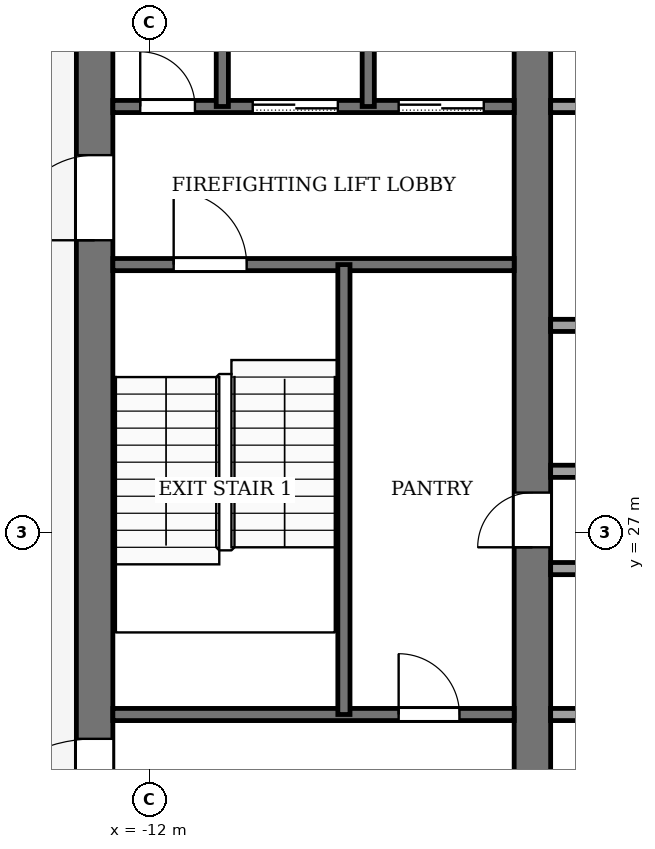
"""IFC4 building model, lengths in metres.
Left out: names, types, materials, properties, quantities, classifications, styles, units other than length and angle.
Written with IfcOpenShell. Run it as: python <this file> out.ifc"""

import sys

from ifc_helpers import new_model, si_unit, direction, frame, frame_2d, origin, place, context, subcontext, project, spatial, rectangle, extrude, element, fill, save


model = new_model("IFC4")
c1 = context("Model", 3, precision=1e-05, world=origin(), true_north=direction((0.0, 1.0)))
c2 = subcontext(c1, "Body", "Model", "MODEL_VIEW")
j1 = project(units=[si_unit("LENGTHUNIT", "METRE"), si_unit("PLANEANGLEUNIT", "RADIAN")], contexts=[c1])
p1 = place(None, origin())
s1 = spatial("IfcSite", under=j1, at=p1, CompositionType="ELEMENT")
p2 = place(p1, origin())
s2 = spatial("IfcBuilding", under=s1, at=p2, CompositionType="ELEMENT")
p3 = place(p2, frame((0.0, 0.0, 294.0)))
s3 = spatial("IfcBuildingStorey", under=s2, at=p3, CompositionType="ELEMENT", Elevation=294.0)
p4 = place(p3, frame((-12.9, 18.4, -0.13), z_axis=(0.0, 0.0, 1.0), x_axis=(0.0, 1.0, 0.0)))
e1 = element("IfcWall", 1, at=p4, inside=s3, PredefinedType="SHEAR", context=c2, shape_type="SweptSolid", body=[
    extrude(rectangle(XDim=19.2, YDim=0.6, at=frame_2d((9.6, 0.0))), origin(), (0.0, 0.0, 1.0), 4.0),
])
p5 = place(p4, frame((2.8, 0.0, 0.13)))
e2 = element("IfcOpeningElement", 2, at=p5, cuts=e1, PredefinedType="OPENING", context=c2, shape_type="SweptSolid", body=[
    extrude(rectangle(XDim=2.4, YDim=2.4, at=frame_2d((1.2, 1.2))), frame((0.0, 0.31, 0.0), z_axis=(0.0, -1.0, 0.0), x_axis=(1.0, 0.0, 0.0)), (0.0, 0.0, 1.0), 0.62),
])
p6 = place(p4, frame((13.4, 0.0, 0.13)))
e3 = element("IfcOpeningElement", 3, at=p6, cuts=e1, PredefinedType="OPENING", context=c2, shape_type="SweptSolid", body=[
    extrude(rectangle(XDim=1.4, YDim=2.2, at=frame_2d((0.7, 1.1))), frame((0.0, 0.31, 0.0), z_axis=(0.0, -1.0, 0.0), x_axis=(1.0, 0.0, 0.0)), (0.0, 0.0, 1.0), 0.62),
])
p7 = place(p3, frame((-5.7, 18.4, -0.13), z_axis=(0.0, 0.0, 1.0), x_axis=(0.0, 1.0, 0.0)))
e4 = element("IfcWall", 4, at=p7, inside=s3, PredefinedType="SHEAR", context=c2, shape_type="SweptSolid", body=[
    extrude(rectangle(XDim=19.2, YDim=0.6, at=frame_2d((9.6, 0.0))), origin(), (0.0, 0.0, 1.0), 4.0),
])
p8 = place(p7, frame((8.35, 0.0, 0.13)))
e5 = element("IfcOpeningElement", 5, at=p8, cuts=e4, PredefinedType="OPENING", context=c2, shape_type="SweptSolid", body=[
    extrude(rectangle(XDim=0.9, YDim=2.1, at=frame_2d((0.45, 1.05))), frame((0.0, 0.31, 0.0), z_axis=(0.0, -1.0, 0.0), x_axis=(1.0, 0.0, 0.0)), (0.0, 0.0, 1.0), 0.62),
])
p9 = place(p3, frame((-12.6, 24.0, 0.0), z_axis=(0.0, 0.0, 1.0), x_axis=(1.0, 0.0, 0.0)))
e6 = element("IfcWall", 6, at=p9, inside=s3, PredefinedType="PARTITIONING", context=c2, shape_type="SweptSolid", body=[
    extrude(rectangle(XDim=6.6, YDim=0.2, at=frame_2d((3.3, 0.0))), origin(), (0.0, 0.0, 1.0), 3.87),
])
p10 = place(p9, frame((4.7, 0.0, 0.0)))
e7 = element("IfcOpeningElement", 7, at=p10, cuts=e6, PredefinedType="OPENING", context=c2, shape_type="SweptSolid", body=[
    extrude(rectangle(XDim=1.0, YDim=2.1, at=frame_2d((0.5, 1.05))), frame((0.0, 0.11, 0.0), z_axis=(0.0, -1.0, 0.0), x_axis=(1.0, 0.0, 0.0)), (0.0, 0.0, 1.0), 0.22),
])
p11 = place(p3, frame((-5.4, 24.0, 0.0), z_axis=(0.0, 0.0, 1.0), x_axis=(1.0, 0.0, 0.0)))
e8 = element("IfcWall", 8, at=p11, inside=s3, PredefinedType="PARTITIONING", context=c2, shape_type="SweptSolid", body=[
    extrude(rectangle(XDim=10.8, YDim=0.2, at=frame_2d((5.4, 0.0))), origin(), (0.0, 0.0, 1.0), 3.87),
])
p12 = place(p11, frame((2.632, 0.0, 0.0)))
e9 = element("IfcOpeningElement", 9, at=p12, cuts=e8, PredefinedType="OPENING", context=c2, shape_type="SweptSolid", body=[
    extrude(rectangle(XDim=1.0, YDim=2.1, at=frame_2d((0.5, 1.05))), frame((0.0, 0.11, 0.0), z_axis=(0.0, -1.0, 0.0), x_axis=(1.0, 0.0, 0.0)), (0.0, 0.0, 1.0), 0.22),
])
p13 = place(p11, frame((8.032, 0.0, 0.0)))
e10 = element("IfcOpeningElement", 10, at=p13, cuts=e8, PredefinedType="OPENING", context=c2, shape_type="SweptSolid", body=[
    extrude(rectangle(XDim=1.0, YDim=2.1, at=frame_2d((0.5, 1.05))), frame((0.0, 0.11, 0.0), z_axis=(0.0, -1.0, 0.0), x_axis=(1.0, 0.0, 0.0)), (0.0, 0.0, 1.0), 0.22),
])
for number, where, z_axis, x_axis in (
    (11, (-5.4, 26.4, 0.0), (0.0, 0.0, 1.0), (1.0, 0.0, 0.0)),
    (12, (-5.4, 28.0, 0.0), (0.0, 0.0, 1.0), (1.0, 0.0, 0.0)),
):
    element("IfcWall", number, at=place(p3, frame(where, z_axis=z_axis, x_axis=x_axis)), inside=s3, PredefinedType="PARTITIONING", context=c2, shape_type="SweptSolid", body=[
        extrude(rectangle(XDim=10.8, YDim=0.2, at=frame_2d((5.4, 0.0))), origin(), (0.0, 0.0, 1.0), 3.87),
    ])
p14 = place(p3, frame((-5.4, 30.4, 0.0), z_axis=(0.0, 0.0, 1.0), x_axis=(1.0, 0.0, 0.0)))
e13 = element("IfcWall", 13, at=p14, inside=s3, PredefinedType="PARTITIONING", context=c2, shape_type="SweptSolid", body=[
    extrude(rectangle(XDim=10.8, YDim=0.2, at=frame_2d((5.4, 0.0))), origin(), (0.0, 0.0, 1.0), 3.87),
])
p15 = place(p14, frame((2.848, 0.0, 0.0)))
e14 = element("IfcOpeningElement", 14, at=p15, cuts=e13, PredefinedType="OPENING", context=c2, shape_type="SweptSolid", body=[
    extrude(rectangle(XDim=1.0, YDim=2.1, at=frame_2d((0.5, 1.05))), frame((0.0, 0.11, 0.0), z_axis=(0.0, -1.0, 0.0), x_axis=(1.0, 0.0, 0.0)), (0.0, 0.0, 1.0), 0.22),
])
p16 = place(p14, frame((8.248, 0.0, 0.0)))
e15 = element("IfcOpeningElement", 15, at=p16, cuts=e13, PredefinedType="OPENING", context=c2, shape_type="SweptSolid", body=[
    extrude(rectangle(XDim=1.0, YDim=2.1, at=frame_2d((0.5, 1.05))), frame((0.0, 0.11, 0.0), z_axis=(0.0, -1.0, 0.0), x_axis=(1.0, 0.0, 0.0)), (0.0, 0.0, 1.0), 0.22),
])
p17 = place(p3, frame((-12.6, 31.4, 0.0), z_axis=(0.0, 0.0, 1.0), x_axis=(1.0, 0.0, 0.0)))
e16 = element("IfcWall", 16, at=p17, inside=s3, PredefinedType="PARTITIONING", context=c2, shape_type="SweptSolid", body=[
    extrude(rectangle(XDim=6.6, YDim=0.2, at=frame_2d((3.3, 0.0))), origin(), (0.0, 0.0, 1.0), 3.87),
])
p18 = place(p17, frame((1.0, 0.0, 0.0)))
e17 = element("IfcOpeningElement", 17, at=p18, cuts=e16, PredefinedType="OPENING", context=c2, shape_type="SweptSolid", body=[
    extrude(rectangle(XDim=1.2, YDim=2.2, at=frame_2d((0.6, 1.1))), frame((0.0, 0.11, 0.0), z_axis=(0.0, -1.0, 0.0), x_axis=(1.0, 0.0, 0.0)), (0.0, 0.0, 1.0), 0.22),
])
p19 = place(p3, frame((-12.6, 34.0, 0.0), z_axis=(0.0, 0.0, 1.0), x_axis=(1.0, 0.0, 0.0)))
e18 = element("IfcWall", 18, at=p19, inside=s3, PredefinedType="PARTITIONING", context=c2, shape_type="SweptSolid", body=[
    extrude(rectangle(XDim=6.6, YDim=0.2, at=frame_2d((3.3, 0.0))), origin(), (0.0, 0.0, 1.0), 3.87),
])
p20 = place(p19, frame((4.7, 0.0, 0.0)))
e19 = element("IfcOpeningElement", 19, at=p20, cuts=e18, PredefinedType="OPENING", context=c2, shape_type="SweptSolid", body=[
    extrude(rectangle(XDim=1.4, YDim=2.2, at=frame_2d((0.7, 1.1))), frame((0.0, 0.11, 0.0), z_axis=(0.0, -1.0, 0.0), x_axis=(1.0, 0.0, 0.0)), (0.0, 0.0, 1.0), 0.22),
])
p21 = place(p19, frame((2.3, 0.0, 0.0)))
e20 = element("IfcOpeningElement", 20, at=p21, cuts=e18, PredefinedType="OPENING", context=c2, shape_type="SweptSolid", body=[
    extrude(rectangle(XDim=1.4, YDim=2.2, at=frame_2d((0.7, 1.1))), frame((0.0, 0.11, 0.0), z_axis=(0.0, -1.0, 0.0), x_axis=(1.0, 0.0, 0.0)), (0.0, 0.0, 1.0), 0.22),
])
p22 = place(p19, frame((0.45, 0.0, 0.0)))
e21 = element("IfcOpeningElement", 21, at=p22, cuts=e18, PredefinedType="OPENING", context=c2, shape_type="SweptSolid", body=[
    extrude(rectangle(XDim=0.9, YDim=2.1, at=frame_2d((0.45, 1.05))), frame((0.0, 0.11, 0.0), z_axis=(0.0, -1.0, 0.0), x_axis=(1.0, 0.0, 0.0)), (0.0, 0.0, 1.0), 0.22),
])
p23 = place(p3, frame((-5.4, 34.0, 0.0), z_axis=(0.0, 0.0, 1.0), x_axis=(1.0, 0.0, 0.0)))
e22 = element("IfcWall", 22, at=p23, inside=s3, PredefinedType="PARTITIONING", context=c2, shape_type="SweptSolid", body=[
    extrude(rectangle(XDim=10.8, YDim=0.2, at=frame_2d((5.4, 0.0))), origin(), (0.0, 0.0, 1.0), 3.87),
])
p24 = place(p23, frame((6.15, 0.0, 0.0)))
e23 = element("IfcOpeningElement", 23, at=p24, cuts=e22, PredefinedType="OPENING", context=c2, shape_type="SweptSolid", body=[
    extrude(rectangle(XDim=1.2, YDim=2.2, at=frame_2d((0.6, 1.1))), frame((0.0, 0.11, 0.0), z_axis=(0.0, -1.0, 0.0), x_axis=(1.0, 0.0, 0.0)), (0.0, 0.0, 1.0), 0.22),
])
p25 = place(p23, frame((8.95, 0.0, 0.0)))
e24 = element("IfcOpeningElement", 24, at=p25, cuts=e22, PredefinedType="OPENING", context=c2, shape_type="SweptSolid", body=[
    extrude(rectangle(XDim=1.0, YDim=2.1, at=frame_2d((0.5, 1.05))), frame((0.0, 0.11, 0.0), z_axis=(0.0, -1.0, 0.0), x_axis=(1.0, 0.0, 0.0)), (0.0, 0.0, 1.0), 0.22),
])
p26 = place(p3, frame((-10.8, 34.0, 0.0), z_axis=(0.0, 0.0, 1.0), x_axis=(0.0, 1.0, 0.0)))
e25 = element("IfcWall", 25, at=p26, inside=s3, PredefinedType="PARTITIONING", context=c2, shape_type="SweptSolid", body=[
    extrude(rectangle(XDim=3.6, YDim=0.2, at=frame_2d((1.8, 0.0))), origin(), (0.0, 0.0, 1.0), 3.87),
])
p27 = place(p3, frame((-8.8, 24.0, 0.0), z_axis=(0.0, 0.0, 1.0), x_axis=(0.0, 1.0, 0.0)))
e26 = element("IfcWall", 26, at=p27, inside=s3, PredefinedType="PARTITIONING", context=c2, shape_type="SweptSolid", body=[
    extrude(rectangle(XDim=7.4, YDim=0.2, at=frame_2d((3.7, 0.0))), origin(), (0.0, 0.0, 1.0), 3.87),
])
p28 = place(p3, frame((-8.4, 34.0, 0.0), z_axis=(0.0, 0.0, 1.0), x_axis=(0.0, 1.0, 0.0)))
e27 = element("IfcWall", 27, at=p28, inside=s3, PredefinedType="PARTITIONING", context=c2, shape_type="SweptSolid", body=[
    extrude(rectangle(XDim=3.6, YDim=0.2, at=frame_2d((1.8, 0.0))), origin(), (0.0, 0.0, 1.0), 3.87),
])
p29 = place(p20, origin())
e28 = element("IfcDoor", 28, at=p29, inside=s3, OperationType="SLIDING_TO_LEFT", PredefinedType="DOOR", context=c2, shape_type="SweptSolid", body=[
    extrude(rectangle(XDim=1.4, YDim=2.2, at=frame_2d((0.7, 1.1))), frame((0.0, 0.025, 0.0), z_axis=(0.0, -1.0, 0.0), x_axis=(1.0, 0.0, 0.0)), (0.0, 0.0, 1.0), 0.05),
])
fill(e19, e28)
p30 = place(p21, origin())
e29 = element("IfcDoor", 29, at=p30, inside=s3, OperationType="SLIDING_TO_LEFT", PredefinedType="DOOR", context=c2, shape_type="SweptSolid", body=[
    extrude(rectangle(XDim=1.4, YDim=2.2, at=frame_2d((0.7, 1.1))), frame((0.0, 0.025, 0.0), z_axis=(0.0, -1.0, 0.0), x_axis=(1.0, 0.0, 0.0)), (0.0, 0.0, 1.0), 0.05),
])
fill(e20, e29)
p31 = place(p22, origin())
e30 = element("IfcDoor", 30, at=p31, inside=s3, OperationType="SINGLE_SWING_RIGHT", PredefinedType="DOOR", context=c2, shape_type="SweptSolid", body=[
    extrude(rectangle(XDim=0.9, YDim=2.1, at=frame_2d((0.45, 1.05))), frame((0.0, 0.025, 0.0), z_axis=(0.0, -1.0, 0.0), x_axis=(1.0, 0.0, 0.0)), (0.0, 0.0, 1.0), 0.05),
])
fill(e21, e30)
p32 = place(p10, origin())
e31 = element("IfcDoor", 31, at=p32, inside=s3, OperationType="SINGLE_SWING_RIGHT", PredefinedType="DOOR", context=c2, shape_type="SweptSolid", body=[
    extrude(rectangle(XDim=1.0, YDim=2.1, at=frame_2d((0.5, 1.05))), frame((0.0, 0.025, 0.0), z_axis=(0.0, -1.0, 0.0), x_axis=(1.0, 0.0, 0.0)), (0.0, 0.0, 1.0), 0.05),
])
fill(e7, e31)
p33 = place(p8, origin())
e32 = element("IfcDoor", 32, at=p33, inside=s3, OperationType="SINGLE_SWING_LEFT", PredefinedType="DOOR", context=c2, shape_type="SweptSolid", body=[
    extrude(rectangle(XDim=0.9, YDim=2.1, at=frame_2d((0.45, 1.05))), frame((0.0, 0.025, 0.0), z_axis=(0.0, -1.0, 0.0), x_axis=(1.0, 0.0, 0.0)), (0.0, 0.0, 1.0), 0.05),
])
fill(e5, e32)
p34 = place(p18, origin())
e33 = element("IfcDoor", 33, at=p34, inside=s3, OperationType="SINGLE_SWING_LEFT", PredefinedType="DOOR", context=c2, shape_type="SweptSolid", body=[
    extrude(rectangle(XDim=1.2, YDim=2.2, at=frame_2d((0.6, 1.1))), frame((0.0, 0.025, 0.0), z_axis=(0.0, -1.0, 0.0), x_axis=(1.0, 0.0, 0.0)), (0.0, 0.0, 1.0), 0.05),
])
fill(e17, e33)
p35 = place(p5, origin())
e34 = element("IfcDoor", 34, at=p35, inside=s3, OperationType="DOUBLE_DOOR_SINGLE_SWING", PredefinedType="DOOR", context=c2, shape_type="SweptSolid", body=[
    extrude(rectangle(XDim=2.4, YDim=2.4, at=frame_2d((1.2, 1.2))), frame((0.0, 0.025, 0.0), z_axis=(0.0, -1.0, 0.0), x_axis=(1.0, 0.0, 0.0)), (0.0, 0.0, 1.0), 0.05),
])
fill(e2, e34)
p36 = place(p6, origin())
e35 = element("IfcDoor", 35, at=p36, inside=s3, OperationType="SINGLE_SWING_LEFT", PredefinedType="DOOR", context=c2, shape_type="SweptSolid", body=[
    extrude(rectangle(XDim=1.4, YDim=2.2, at=frame_2d((0.7, 1.1))), frame((0.0, 0.025, 0.0), z_axis=(0.0, -1.0, 0.0), x_axis=(1.0, 0.0, 0.0)), (0.0, 0.0, 1.0), 0.05),
])
fill(e3, e35)
save(model, sys.argv[1])
